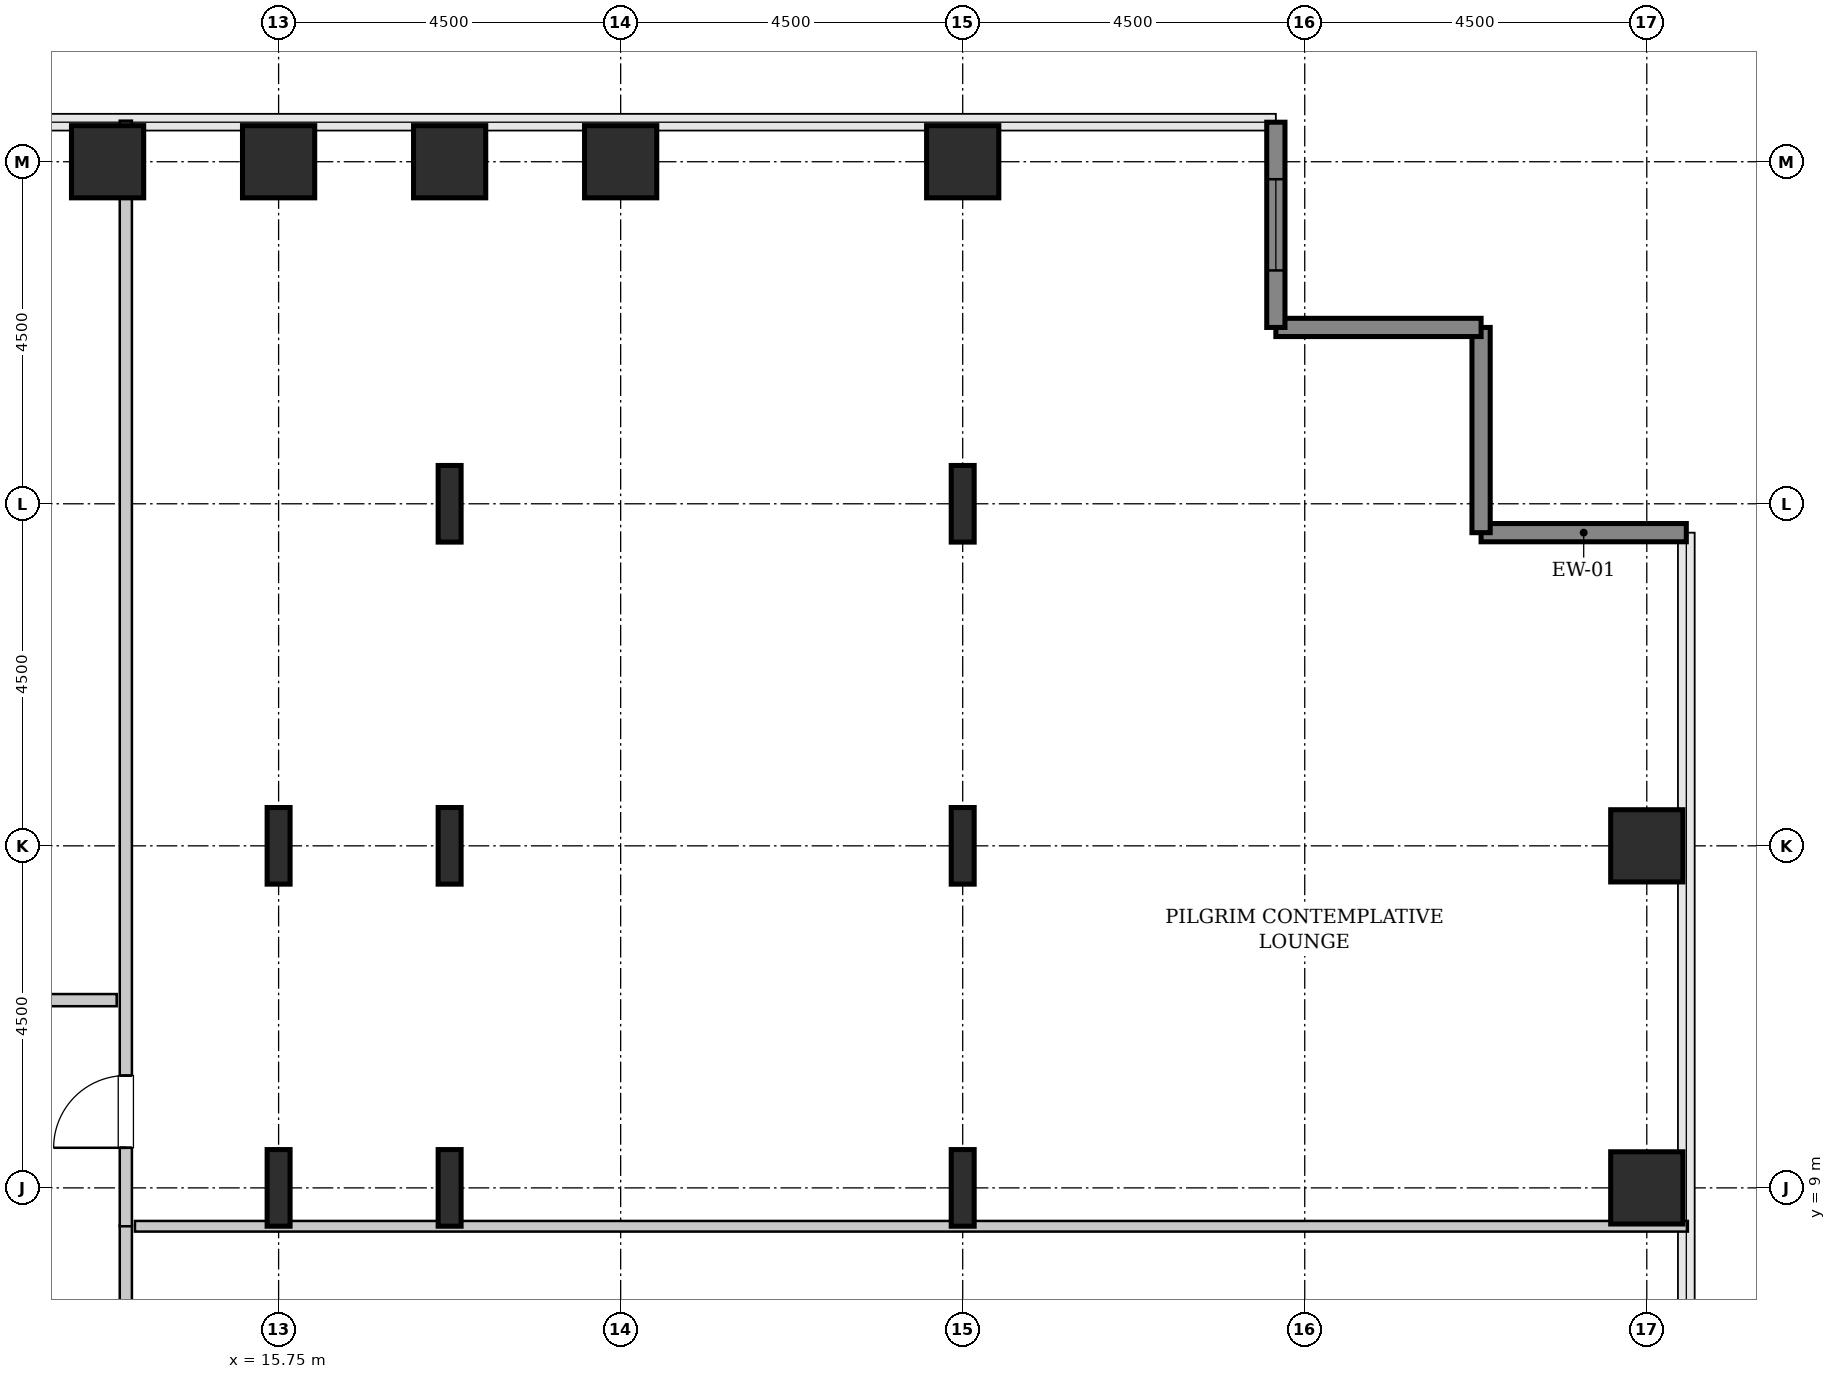
"""IFC4 building model, lengths in metres.
Left out: names, types, materials, properties, quantities, classifications, styles, units other than length and angle.
Written with IfcOpenShell. Run it as: python <this file> out.ifc"""

import sys

from ifc_helpers import new_model, si_unit, direction, frame, frame_2d, origin, origin_2d, place, context, subcontext, project, spatial, rectangle, hollow_rectangle, i_section, extrude, source, transform, mapped, element, fill, save


model = new_model("IFC4")
c1 = context("Model", 3, precision=1e-05, world=origin(), true_north=direction((0.0, 1.0)))
c2 = subcontext(c1, "Body", "Model", "MODEL_VIEW")
j1 = project(units=[si_unit("LENGTHUNIT", "METRE"), si_unit("PLANEANGLEUNIT", "RADIAN")], contexts=[c1])
p1 = place(None, origin())
s1 = spatial("IfcSite", under=j1, at=p1, CompositionType="ELEMENT")
p2 = place(p1, origin())
s2 = spatial("IfcBuilding", under=s1, at=p2, CompositionType="ELEMENT")
p3 = place(p2, frame((0.0, 0.0, 63.4)))
s3 = spatial("IfcBuildingStorey", under=s2, at=p3, CompositionType="ELEMENT", Elevation=63.4)
m1 = source(origin(), c2, "Body", "SweptSolid", [
    extrude(hollow_rectangle(XDim=0.95, YDim=0.95, WallThickness=0.045, InnerFilletRadius=0.045, OuterFilletRadius=0.09, at=origin_2d()), origin(), (0.0, 0.0, 1.0), 3.8),
])
p4 = place(p3, frame((13.5, 22.5, 0.0), z_axis=(0.0, 0.0, 1.0), x_axis=(1.0, 0.0, 0.0)))
e1 = element("IfcColumn", 1, at=p4, inside=s3, PredefinedType="COLUMN", context=c2, shape_type="MappedRepresentation", body=[
    mapped(m1, transform((0.0, 0.0, 0.0), x_axis=(1.0, 0.0, 0.0), y_axis=(0.0, 1.0, 0.0), z_axis=(0.0, 0.0, 1.0), scale=1.0)),
])
m2 = source(origin(), c2, "Body", "SweptSolid", [
    extrude(i_section(OverallWidth=0.302, OverallDepth=1.008, WebThickness=0.021, FlangeThickness=0.04, FilletRadius=0.03, at=origin_2d()), origin(), (0.0, 0.0, 1.0), 3.8),
])
for number, where, z_axis, x_axis in (
    (2, (15.75, 9.0, 0.0), (0.0, 0.0, 1.0), (1.0, 0.0, 0.0)),
    (3, (15.75, 13.5, 0.0), (0.0, 0.0, 1.0), (1.0, 0.0, 0.0)),
):
    element("IfcColumn", number, at=place(p3, frame(where, z_axis=z_axis, x_axis=x_axis)), inside=s3, PredefinedType="COLUMN", context=c2, shape_type="MappedRepresentation", body=[
        mapped(m2, transform((0.0, 0.0, 0.0), x_axis=(1.0, 0.0, 0.0), y_axis=(0.0, 1.0, 0.0), z_axis=(0.0, 0.0, 1.0), scale=1.0)),
    ])
p5 = place(p3, frame((15.75, 22.5, 0.0), z_axis=(0.0, 0.0, 1.0), x_axis=(1.0, 0.0, 0.0)))
e4 = element("IfcColumn", 4, at=p5, inside=s3, PredefinedType="COLUMN", context=c2, shape_type="MappedRepresentation", body=[
    mapped(m1, transform((0.0, 0.0, 0.0), x_axis=(1.0, 0.0, 0.0), y_axis=(0.0, 1.0, 0.0), z_axis=(0.0, 0.0, 1.0), scale=1.0)),
])
for number, where, z_axis, x_axis in (
    (5, (18.0, 9.0, 0.0), (0.0, 0.0, 1.0), (1.0, 0.0, 0.0)),
    (6, (18.0, 13.5, 0.0), (0.0, 0.0, 1.0), (1.0, 0.0, 0.0)),
    (7, (18.0, 18.0, 0.0), (0.0, 0.0, 1.0), (1.0, 0.0, 0.0)),
):
    element("IfcColumn", number, at=place(p3, frame(where, z_axis=z_axis, x_axis=x_axis)), inside=s3, PredefinedType="COLUMN", context=c2, shape_type="MappedRepresentation", body=[
        mapped(m2, transform((0.0, 0.0, 0.0), x_axis=(1.0, 0.0, 0.0), y_axis=(0.0, 1.0, 0.0), z_axis=(0.0, 0.0, 1.0), scale=1.0)),
    ])
for number, where, z_axis, x_axis in (
    (8, (18.0, 22.5, 0.0), (0.0, 0.0, 1.0), (1.0, 0.0, 0.0)),
    (9, (20.25, 22.5, 0.0), (0.0, 0.0, 1.0), (1.0, 0.0, 0.0)),
):
    element("IfcColumn", number, at=place(p3, frame(where, z_axis=z_axis, x_axis=x_axis)), inside=s3, PredefinedType="COLUMN", context=c2, shape_type="MappedRepresentation", body=[
        mapped(m1, transform((0.0, 0.0, 0.0), x_axis=(1.0, 0.0, 0.0), y_axis=(0.0, 1.0, 0.0), z_axis=(0.0, 0.0, 1.0), scale=1.0)),
    ])
for number, where, z_axis, x_axis in (
    (10, (24.75, 9.0, 0.0), (0.0, 0.0, 1.0), (1.0, 0.0, 0.0)),
    (11, (24.75, 13.5, 0.0), (0.0, 0.0, 1.0), (1.0, 0.0, 0.0)),
    (12, (24.75, 18.0, 0.0), (0.0, 0.0, 1.0), (1.0, 0.0, 0.0)),
):
    element("IfcColumn", number, at=place(p3, frame(where, z_axis=z_axis, x_axis=x_axis)), inside=s3, PredefinedType="COLUMN", context=c2, shape_type="MappedRepresentation", body=[
        mapped(m2, transform((0.0, 0.0, 0.0), x_axis=(1.0, 0.0, 0.0), y_axis=(0.0, 1.0, 0.0), z_axis=(0.0, 0.0, 1.0), scale=1.0)),
    ])
for number, where, z_axis, x_axis in (
    (13, (24.75, 22.5, 0.0), (0.0, 0.0, 1.0), (1.0, 0.0, 0.0)),
    (14, (33.75, 9.0, 0.0), (0.0, 0.0, 1.0), (1.0, 0.0, 0.0)),
    (15, (33.75, 13.5, 0.0), (0.0, 0.0, 1.0), (1.0, 0.0, 0.0)),
):
    element("IfcColumn", number, at=place(p3, frame(where, z_axis=z_axis, x_axis=x_axis)), inside=s3, PredefinedType="COLUMN", context=c2, shape_type="MappedRepresentation", body=[
        mapped(m1, transform((0.0, 0.0, 0.0), x_axis=(1.0, 0.0, 0.0), y_axis=(0.0, 1.0, 0.0), z_axis=(0.0, 0.0, 1.0), scale=1.0)),
    ])
m3 = source(origin(), c2, "Body", "SweptSolid", [
    extrude(rectangle(XDim=2.7, YDim=0.24, at=frame_2d((1.35, 0.0))), origin(), (0.0, 0.0, 1.0), 3.55),
])
for number, where, z_axis, x_axis in (
    (16, (34.27, 17.62, 0.0), (0.0, 0.0, 1.0), (-1.0, 0.0, 0.0)),
    (17, (31.57, 17.62, 0.0), (0.0, 0.0, 1.0), (0.0, 1.0, 0.0)),
    (18, (31.57, 20.32, 0.0), (0.0, 0.0, 1.0), (-1.0, 0.0, 0.0)),
):
    element("IfcWall", number, at=place(p3, frame(where, z_axis=z_axis, x_axis=x_axis)), inside=s3, PredefinedType="SHEAR", context=c2, shape_type="MappedRepresentation", body=[
        mapped(m3, transform((0.0, 0.0, 0.0), x_axis=(1.0, 0.0, 0.0), y_axis=(0.0, 1.0, 0.0), z_axis=(0.0, 0.0, 1.0), scale=1.0)),
    ])
p6 = place(p3, frame((28.87, 20.32, 0.0), z_axis=(0.0, 0.0, 1.0), x_axis=(0.0, 1.0, 0.0)))
e19 = element("IfcWall", 19, at=p6, inside=s3, PredefinedType="SHEAR", context=c2, shape_type="MappedRepresentation", body=[
    mapped(m3, transform((0.0, 0.0, 0.0), x_axis=(1.0, 0.0, 0.0), y_axis=(0.0, 1.0, 0.0), z_axis=(0.0, 0.0, 1.0), scale=1.0)),
])
p7 = place(p6, frame((0.75, 0.0, 0.85)))
e20 = element("IfcOpeningElement", 20, at=p7, cuts=e19, PredefinedType="OPENING", context=c2, shape_type="SweptSolid", body=[
    extrude(rectangle(XDim=1.2, YDim=1.8, at=frame_2d((0.6, 0.9))), frame((0.0, 0.13, 0.0), z_axis=(0.0, -1.0, 0.0), x_axis=(1.0, 0.0, 0.0)), (0.0, 0.0, 1.0), 0.26),
])
m4 = source(origin(), c2, "Body", "SweptSolid", [
    extrude(rectangle(XDim=3.31, YDim=0.16, at=frame_2d((1.655, 0.0))), origin(), (0.0, 0.0, 1.0), 3.535),
])
p8 = place(p3, frame((13.74, 5.195, 0.0), z_axis=(0.0, 0.0, 1.0), x_axis=(0.0, 1.0, 0.0)))
e21 = element("IfcWall", 21, at=p8, inside=s3, PredefinedType="PARTITIONING", context=c2, shape_type="MappedRepresentation", body=[
    mapped(m4, transform((0.0, 0.0, 0.0), x_axis=(1.0, 0.0, 0.0), y_axis=(0.0, 1.0, 0.0), z_axis=(0.0, 0.0, 1.0), scale=1.0)),
])
p9 = place(p8, frame((1.18, 0.0, 0.0)))
e22 = element("IfcOpeningElement", 22, at=p9, cuts=e21, PredefinedType="OPENING", context=c2, shape_type="SweptSolid", body=[
    extrude(rectangle(XDim=0.95, YDim=2.1, at=frame_2d((0.475, 1.05))), frame((0.0, 0.09, 0.0), z_axis=(0.0, -1.0, 0.0), x_axis=(1.0, 0.0, 0.0)), (0.0, 0.0, 1.0), 0.18),
])
m5 = source(origin(), c2, "Body", "SweptSolid", [
    extrude(rectangle(XDim=20.43, YDim=0.14, at=frame_2d((10.215, 0.0))), origin(), (0.0, 0.0, 1.0), 2.825),
])
p10 = place(p3, frame((13.86, 8.495, 0.0), z_axis=(0.0, 0.0, 1.0), x_axis=(1.0, 0.0, 0.0)))
e23 = element("IfcWall", 23, at=p10, inside=s3, PredefinedType="PARTITIONING", context=c2, shape_type="MappedRepresentation", body=[
    mapped(m5, transform((0.0, 0.0, 0.0), x_axis=(1.0, 0.0, 0.0), y_axis=(0.0, 1.0, 0.0), z_axis=(0.0, 0.0, 1.0), scale=1.0)),
])
m6 = source(origin(), c2, "Body", "SweptSolid", [
    extrude(rectangle(XDim=14.545, YDim=0.16, at=frame_2d((7.272, 0.0))), origin(), (0.0, 0.0, 1.0), 3.535),
])
p11 = place(p3, frame((13.74, 8.495, 0.0), z_axis=(0.0, 0.0, 1.0), x_axis=(0.0, 1.0, 0.0)))
e24 = element("IfcWall", 24, at=p11, inside=s3, PredefinedType="PARTITIONING", context=c2, shape_type="MappedRepresentation", body=[
    mapped(m6, transform((0.0, 0.0, 0.0), x_axis=(1.0, 0.0, 0.0), y_axis=(0.0, 1.0, 0.0), z_axis=(0.0, 0.0, 1.0), scale=1.0)),
])
p12 = place(p11, frame((1.032, 0.0, 0.0)))
e25 = element("IfcOpeningElement", 25, at=p12, cuts=e24, PredefinedType="OPENING", context=c2, shape_type="SweptSolid", body=[
    extrude(rectangle(XDim=0.95, YDim=2.1, at=frame_2d((0.475, 1.05))), frame((0.0, 0.09, 0.0), z_axis=(0.0, -1.0, 0.0), x_axis=(1.0, 0.0, 0.0)), (0.0, 0.0, 1.0), 0.18),
])
m7 = source(origin(), c2, "Body", "SweptSolid", [
    extrude(rectangle(XDim=5.825, YDim=0.16, at=frame_2d((2.913, 0.0))), origin(), (0.0, 0.0, 1.0), 3.535),
])
p13 = place(p3, frame((7.795, 11.47, 0.0), z_axis=(0.0, 0.0, 1.0), x_axis=(1.0, 0.0, 0.0)))
e26 = element("IfcWall", 26, at=p13, inside=s3, PredefinedType="PARTITIONING", context=c2, shape_type="MappedRepresentation", body=[
    mapped(m7, transform((0.0, 0.0, 0.0), x_axis=(1.0, 0.0, 0.0), y_axis=(0.0, 1.0, 0.0), z_axis=(0.0, 0.0, 1.0), scale=1.0)),
])
p14 = place(p13, frame((2.438, 0.0, 0.0)))
e27 = element("IfcOpeningElement", 27, at=p14, cuts=e26, PredefinedType="OPENING", context=c2, shape_type="SweptSolid", body=[
    extrude(rectangle(XDim=0.95, YDim=2.1, at=frame_2d((0.475, 1.05))), frame((0.0, 0.09, 0.0), z_axis=(0.0, -1.0, 0.0), x_axis=(1.0, 0.0, 0.0)), (0.0, 0.0, 1.0), 0.18),
])
m8 = source(origin(), c2, "Body", "SweptSolid", [
    extrude(rectangle(XDim=1.2, YDim=1.8, at=frame_2d((0.6, 0.9))), frame((0.0, 0.03, 0.0), z_axis=(0.0, -1.0, 0.0), x_axis=(1.0, 0.0, 0.0)), (0.0, 0.0, 1.0), 0.06),
])
p15 = place(p7, origin())
e28 = element("IfcWindow", 28, at=p15, inside=s3, PartitioningType="SINGLE_PANEL", PredefinedType="WINDOW", context=c2, shape_type="MappedRepresentation", body=[
    mapped(m8, transform((0.0, 0.0, 0.0), x_axis=(1.0, 0.0, 0.0), y_axis=(0.0, 1.0, 0.0), z_axis=(0.0, 0.0, 1.0), scale=1.0)),
])
fill(e20, e28)
m9 = source(origin(), c2, "Body", "SweptSolid", [
    extrude(rectangle(XDim=0.95, YDim=2.1, at=frame_2d((0.475, 1.05))), frame((0.0, 0.025, 0.0), z_axis=(0.0, -1.0, 0.0), x_axis=(1.0, 0.0, 0.0)), (0.0, 0.0, 1.0), 0.05),
])
p16 = place(p12, origin())
e29 = element("IfcDoor", 29, at=p16, inside=s3, OperationType="SINGLE_SWING_LEFT", PredefinedType="DOOR", context=c2, shape_type="MappedRepresentation", body=[
    mapped(m9, transform((0.0, 0.0, 0.0), x_axis=(1.0, 0.0, 0.0), y_axis=(0.0, 1.0, 0.0), z_axis=(0.0, 0.0, 1.0), scale=1.0)),
])
fill(e25, e29)
save(model, sys.argv[1])
